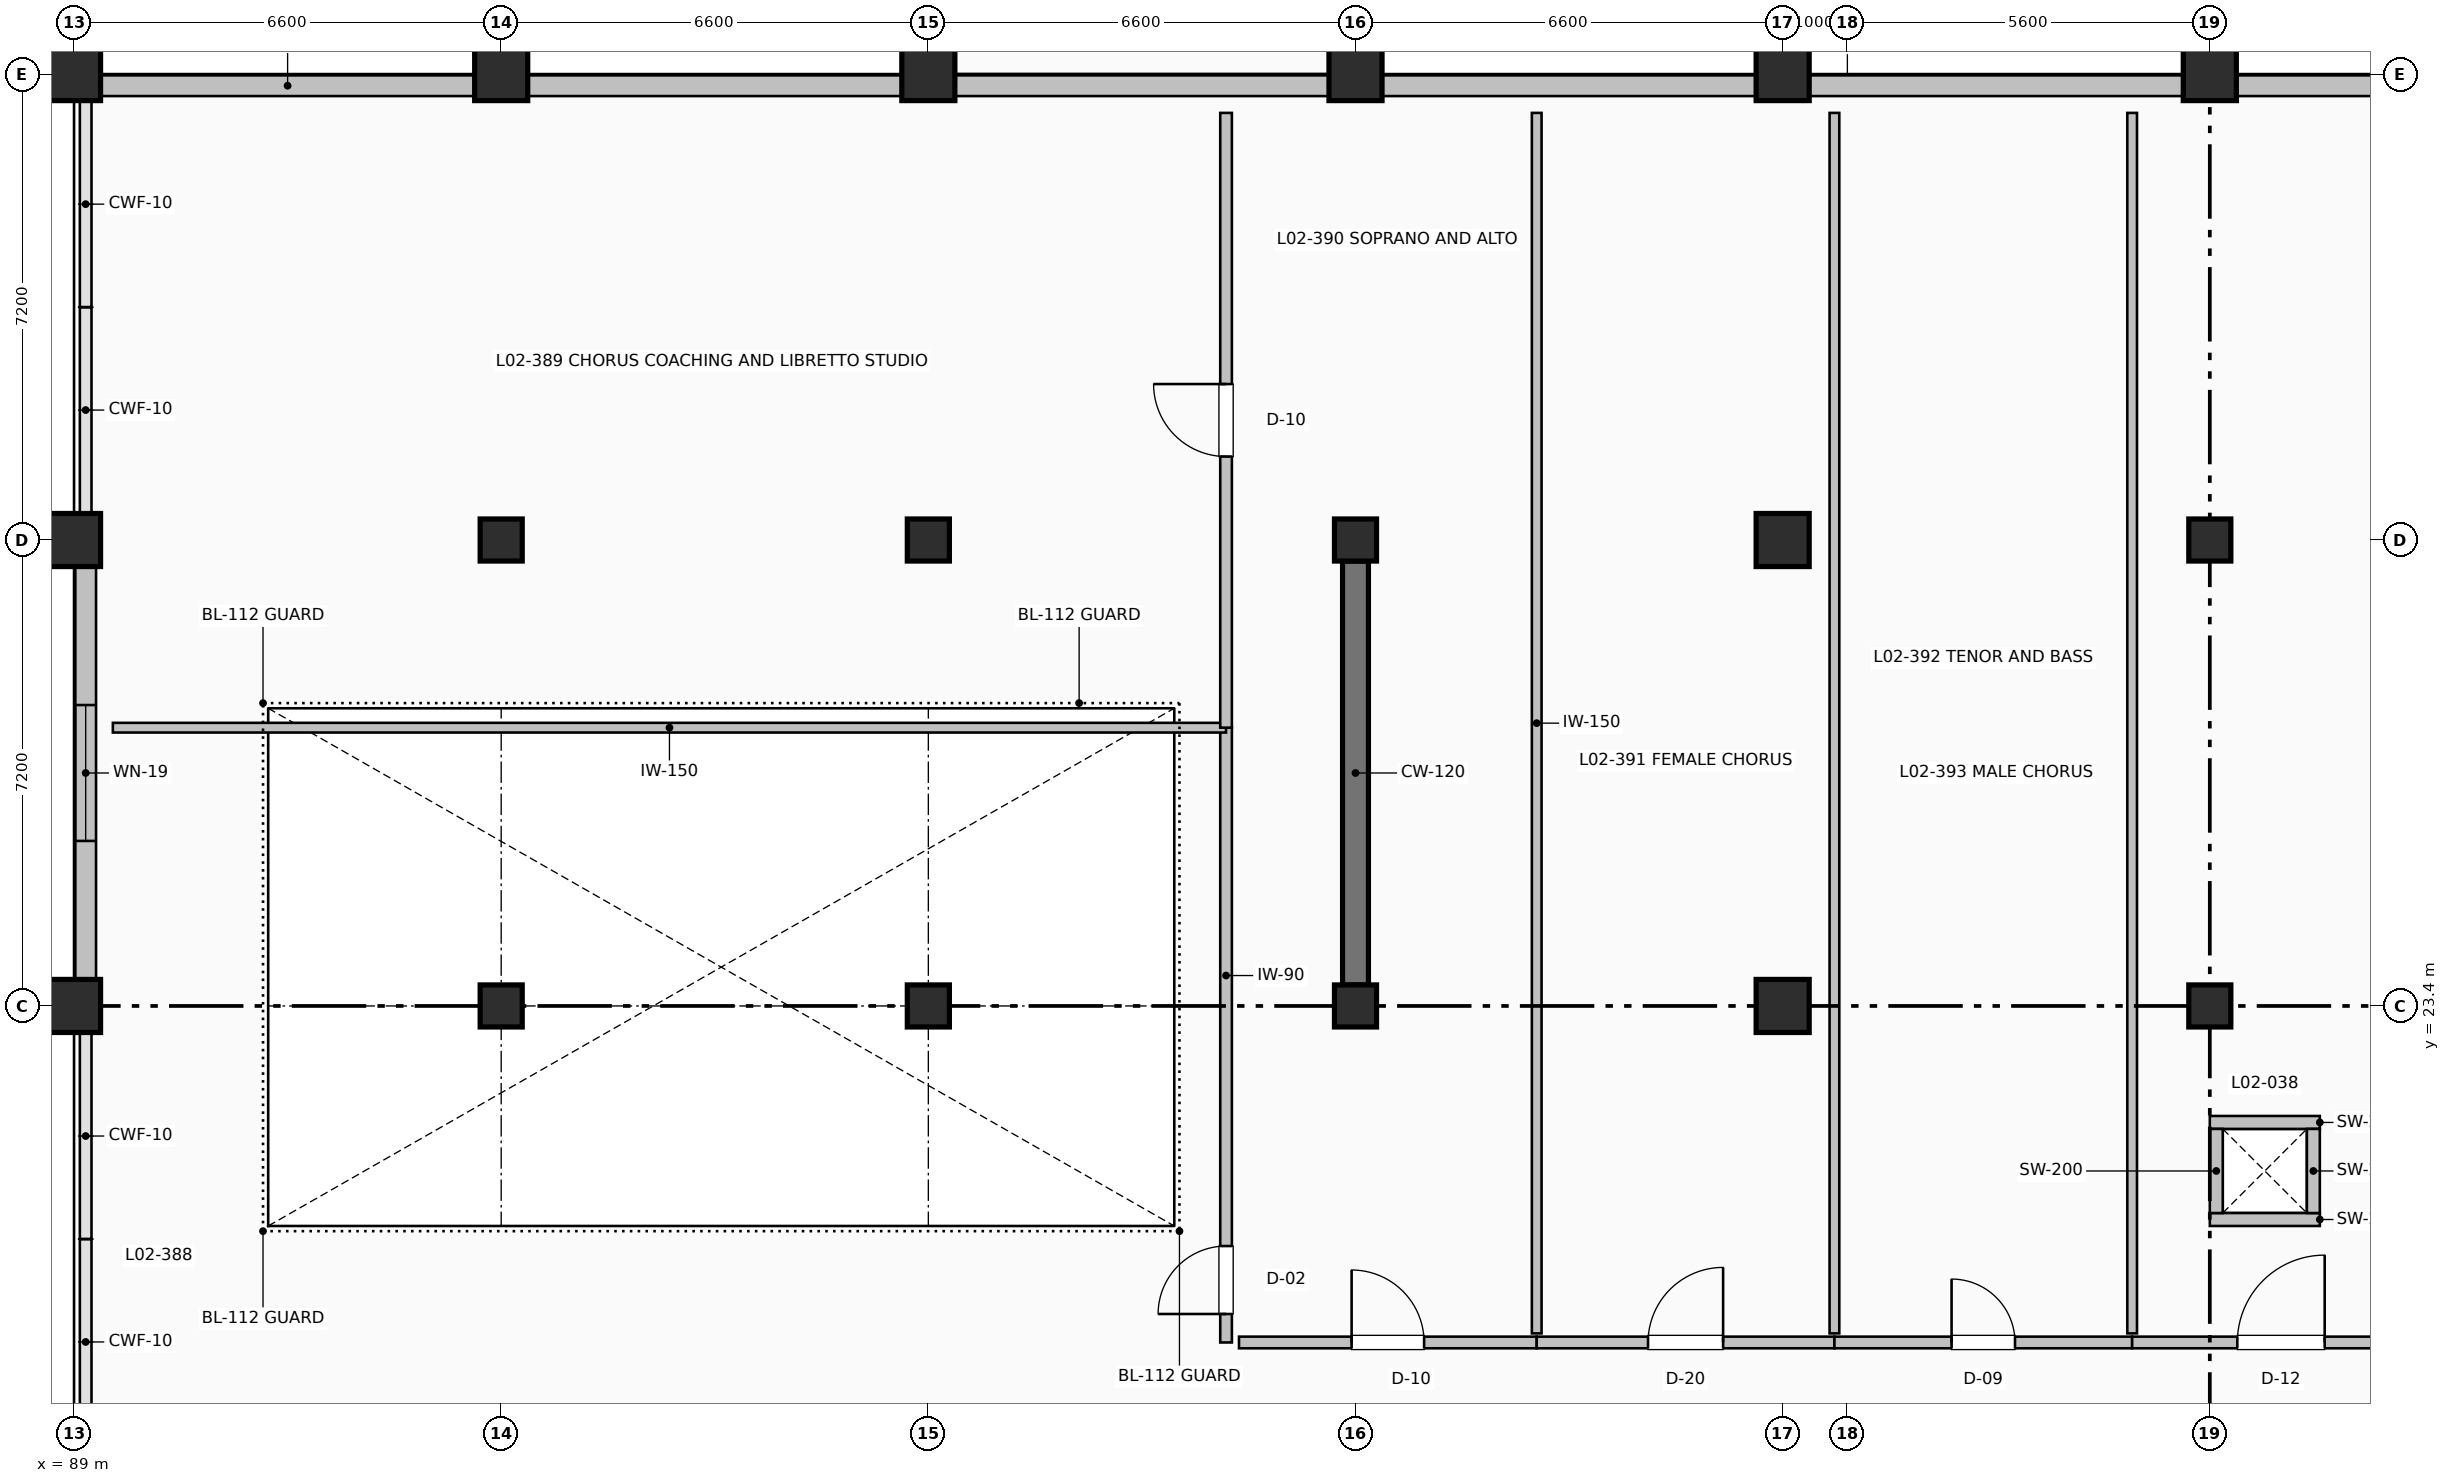
"""IFC4 building model, lengths in metres.
Left out: names, types, materials, properties, quantities, classifications, styles, units other than length and angle.
Written with IfcOpenShell. Run it as: python <this file> out.ifc"""

import sys

from ifc_helpers import new_model, si_unit, direction, frame, frame_2d, origin, origin_2d, place, context, subcontext, project, spatial, rectangle, extrude, element, fill, save


model = new_model("IFC4")
c1 = context("Model", 3, precision=1e-05, world=origin(), true_north=direction((0.0, 1.0)))
c2 = subcontext(c1, "Body", "Model", "MODEL_VIEW")
j1 = project(units=[si_unit("LENGTHUNIT", "METRE"), si_unit("PLANEANGLEUNIT", "RADIAN")], contexts=[c1])
p1 = place(None, origin())
s1 = spatial("IfcSite", under=j1, at=p1, CompositionType="ELEMENT")
p2 = place(p1, origin())
s2 = spatial("IfcBuilding", under=s1, at=p2, CompositionType="ELEMENT")
p3 = place(p2, frame((0.0, 0.0, 10.2)))
s3 = spatial("IfcBuildingStorey", under=s2, at=p3, CompositionType="ELEMENT", Elevation=10.2)
for number, where, z_axis, x_axis in (
    (1, (89.0, 23.4, 0.0), (0.0, 0.0, 1.0), (1.0, 0.0, 0.0)),
    (2, (89.0, 30.6, 0.0), (0.0, 0.0, 1.0), (1.0, 0.0, 0.0)),
    (3, (89.0, 37.8, 0.0), (0.0, 0.0, 1.0), (1.0, 0.0, 0.0)),
):
    element("IfcColumn", number, at=place(p3, frame(where, z_axis=z_axis, x_axis=x_axis)), inside=s3, PredefinedType="COLUMN", context=c2, shape_type="SweptSolid", body=[
        extrude(rectangle(XDim=0.82, YDim=0.82, at=origin_2d()), origin(), (0.0, 0.0, 1.0), 4.8),
    ])
for number, where, z_axis, x_axis in (
    (4, (95.6, 23.4, 0.0), (0.0, 0.0, 1.0), (1.0, 0.0, 0.0)),
    (5, (95.6, 30.6, 0.0), (0.0, 0.0, 1.0), (1.0, 0.0, 0.0)),
):
    element("IfcColumn", number, at=place(p3, frame(where, z_axis=z_axis, x_axis=x_axis)), inside=s3, PredefinedType="COLUMN", context=c2, shape_type="SweptSolid", body=[
        extrude(rectangle(XDim=0.65, YDim=0.65, at=origin_2d()), origin(), (0.0, 0.0, 1.0), 4.8),
    ])
p4 = place(p3, frame((95.6, 37.8, 0.0), z_axis=(0.0, 0.0, 1.0), x_axis=(1.0, 0.0, 0.0)))
e6 = element("IfcColumn", 6, at=p4, inside=s3, PredefinedType="COLUMN", context=c2, shape_type="SweptSolid", body=[
    extrude(rectangle(XDim=0.82, YDim=0.82, at=origin_2d()), origin(), (0.0, 0.0, 1.0), 4.8),
])
for number, where, z_axis, x_axis in (
    (7, (102.2, 23.4, 0.0), (0.0, 0.0, 1.0), (1.0, 0.0, 0.0)),
    (8, (102.2, 30.6, 0.0), (0.0, 0.0, 1.0), (1.0, 0.0, 0.0)),
):
    element("IfcColumn", number, at=place(p3, frame(where, z_axis=z_axis, x_axis=x_axis)), inside=s3, PredefinedType="COLUMN", context=c2, shape_type="SweptSolid", body=[
        extrude(rectangle(XDim=0.65, YDim=0.65, at=origin_2d()), origin(), (0.0, 0.0, 1.0), 4.8),
    ])
p5 = place(p3, frame((102.2, 37.8, 0.0), z_axis=(0.0, 0.0, 1.0), x_axis=(1.0, 0.0, 0.0)))
e9 = element("IfcColumn", 9, at=p5, inside=s3, PredefinedType="COLUMN", context=c2, shape_type="SweptSolid", body=[
    extrude(rectangle(XDim=0.82, YDim=0.82, at=origin_2d()), origin(), (0.0, 0.0, 1.0), 4.8),
])
for number, where, z_axis, x_axis in (
    (10, (108.8, 23.4, 0.0), (0.0, 0.0, 1.0), (1.0, 0.0, 0.0)),
    (11, (108.8, 30.6, 0.0), (0.0, 0.0, 1.0), (1.0, 0.0, 0.0)),
):
    element("IfcColumn", number, at=place(p3, frame(where, z_axis=z_axis, x_axis=x_axis)), inside=s3, PredefinedType="COLUMN", context=c2, shape_type="SweptSolid", body=[
        extrude(rectangle(XDim=0.65, YDim=0.65, at=origin_2d()), origin(), (0.0, 0.0, 1.0), 4.8),
    ])
for number, where, z_axis, x_axis in (
    (12, (108.8, 37.8, 0.0), (0.0, 0.0, 1.0), (1.0, 0.0, 0.0)),
    (13, (115.4, 23.4, 0.0), (0.0, 0.0, 1.0), (1.0, 0.0, 0.0)),
    (14, (115.4, 30.6, 0.0), (0.0, 0.0, 1.0), (1.0, 0.0, 0.0)),
    (15, (115.4, 37.8, 0.0), (0.0, 0.0, 1.0), (1.0, 0.0, 0.0)),
):
    element("IfcColumn", number, at=place(p3, frame(where, z_axis=z_axis, x_axis=x_axis)), inside=s3, PredefinedType="COLUMN", context=c2, shape_type="SweptSolid", body=[
        extrude(rectangle(XDim=0.82, YDim=0.82, at=origin_2d()), origin(), (0.0, 0.0, 1.0), 4.8),
    ])
for number, where, z_axis, x_axis in (
    (16, (122.0, 23.4, 0.0), (0.0, 0.0, 1.0), (1.0, 0.0, 0.0)),
    (17, (122.0, 30.6, 0.0), (0.0, 0.0, 1.0), (1.0, 0.0, 0.0)),
):
    element("IfcColumn", number, at=place(p3, frame(where, z_axis=z_axis, x_axis=x_axis)), inside=s3, PredefinedType="COLUMN", context=c2, shape_type="SweptSolid", body=[
        extrude(rectangle(XDim=0.65, YDim=0.65, at=origin_2d()), origin(), (0.0, 0.0, 1.0), 4.8),
    ])
p6 = place(p3, frame((122.0, 37.8, 0.0), z_axis=(0.0, 0.0, 1.0), x_axis=(1.0, 0.0, 0.0)))
e18 = element("IfcColumn", 18, at=p6, inside=s3, PredefinedType="COLUMN", context=c2, shape_type="SweptSolid", body=[
    extrude(rectangle(XDim=0.82, YDim=0.82, at=origin_2d()), origin(), (0.0, 0.0, 1.0), 4.8),
])
p7 = place(p3, frame((108.8, 23.725, 0.0), z_axis=(0.0, 0.0, 1.0), x_axis=(0.0, 1.0, 0.0)))
e19 = element("IfcWall", 19, at=p7, inside=s3, PredefinedType="SHEAR", context=c2, shape_type="SweptSolid", body=[
    extrude(rectangle(XDim=6.55, YDim=0.4, at=frame_2d((3.275, 0.0))), origin(), (0.0, 0.0, 1.0), 4.48),
])
for number, where, z_axis, x_axis in (
    (20, (89.41, 37.62, 0.0), (0.0, 0.0, 1.0), (1.0, 0.0, 0.0)),
    (21, (96.01, 37.62, 0.0), (0.0, 0.0, 1.0), (1.0, 0.0, 0.0)),
):
    element("IfcWall", number, at=place(p3, frame(where, z_axis=z_axis, x_axis=x_axis)), inside=s3, PredefinedType="SOLIDWALL", context=c2, shape_type="SweptSolid", body=[
        extrude(rectangle(XDim=5.78, YDim=0.32, at=frame_2d((2.89, 0.0))), origin(), (0.0, 0.0, 1.0), 3.742),
    ])
p8 = place(p3, frame((102.61, 37.62, 0.0), z_axis=(0.0, 0.0, 1.0), x_axis=(1.0, 0.0, 0.0)))
e22 = element("IfcWall", 22, at=p8, inside=s3, PredefinedType="SOLIDWALL", context=c2, shape_type="SweptSolid", body=[
    extrude(rectangle(XDim=5.78, YDim=0.32, at=frame_2d((2.89, 0.0))), origin(), (0.0, 0.0, 1.0), 3.742),
])
for number, where, z_axis, x_axis in (
    (23, (109.21, 37.62, 0.0), (0.0, 0.0, 1.0), (1.0, 0.0, 0.0)),
    (24, (115.81, 37.62, 0.0), (0.0, 0.0, 1.0), (1.0, 0.0, 0.0)),
    (25, (122.41, 37.62, 0.0), (0.0, 0.0, 1.0), (1.0, 0.0, 0.0)),
):
    element("IfcWall", number, at=place(p3, frame(where, z_axis=z_axis, x_axis=x_axis)), inside=s3, PredefinedType="SOLIDWALL", context=c2, shape_type="SweptSolid", body=[
        extrude(rectangle(XDim=5.78, YDim=0.32, at=frame_2d((2.89, 0.0))), origin(), (0.0, 0.0, 1.0), 3.742),
    ])
p9 = place(p3, frame((89.18, 23.81, 0.0), z_axis=(0.0, 0.0, 1.0), x_axis=(0.0, 1.0, 0.0)))
e26 = element("IfcWall", 26, at=p9, inside=s3, PredefinedType="SOLIDWALL", context=c2, shape_type="SweptSolid", body=[
    extrude(rectangle(XDim=6.38, YDim=0.32, at=frame_2d((3.19, 0.0))), origin(), (0.0, 0.0, 1.0), 3.742),
])
p10 = place(p9, frame((2.14, 0.0, 1.0)))
e27 = element("IfcOpeningElement", 27, at=p10, cuts=e26, PredefinedType="OPENING", context=c2, shape_type="SweptSolid", body=[
    extrude(rectangle(XDim=2.1, YDim=1.7, at=frame_2d((1.05, 0.85))), frame((0.0, 0.17, 0.0), z_axis=(0.0, -1.0, 0.0), x_axis=(1.0, 0.0, 0.0)), (0.0, 0.0, 1.0), 0.34),
])
for number, where, z_axis, x_axis in (
    (28, (122.0, 20.1, 0.0), (0.0, 0.0, 1.0), (1.0, 0.0, 0.0)),
    (29, (123.7, 21.6, 0.0), (0.0, 0.0, 1.0), (-1.0, 0.0, 0.0)),
):
    element("IfcWall", number, at=place(p3, frame(where, z_axis=z_axis, x_axis=x_axis)), inside=s3, PredefinedType="PARTITIONING", context=c2, shape_type="SweptSolid", body=[
        extrude(rectangle(XDim=1.7, YDim=0.2, at=frame_2d((0.85, 0.0))), origin(), (0.0, 0.0, 1.0), 4.5),
    ])
p11 = place(p3, frame((122.1, 20.2, 0.0), z_axis=(0.0, 0.0, 1.0), x_axis=(0.0, 1.0, 0.0)))
e30 = element("IfcWall", 30, at=p11, inside=s3, PredefinedType="PARTITIONING", context=c2, shape_type="SweptSolid", body=[
    extrude(rectangle(XDim=1.3, YDim=0.2, at=frame_2d((0.65, 0.0))), origin(), (0.0, 0.0, 1.0), 3.742),
])
p12 = place(p3, frame((123.6, 21.5, 0.0), z_axis=(0.0, 0.0, 1.0), x_axis=(0.0, -1.0, 0.0)))
e31 = element("IfcWall", 31, at=p12, inside=s3, PredefinedType="PARTITIONING", context=c2, shape_type="SweptSolid", body=[
    extrude(rectangle(XDim=1.3, YDim=0.2, at=frame_2d((0.65, 0.0))), origin(), (0.0, 0.0, 1.0), 4.5),
])
p13 = place(p3, frame((106.8, 18.2, 0.0), z_axis=(0.0, 0.0, 1.0), x_axis=(0.0, 1.0, 0.0)))
e32 = element("IfcWall", 32, at=p13, inside=s3, PredefinedType="PARTITIONING", context=c2, shape_type="SweptSolid", body=[
    extrude(rectangle(XDim=9.5, YDim=0.18, at=frame_2d((4.75, 0.0))), origin(), (0.0, 0.0, 1.0), 4.492),
])
p14 = place(p13, frame((0.44, 0.0, 0.0)))
e33 = element("IfcOpeningElement", 33, at=p14, cuts=e32, PredefinedType="OPENING", context=c2, shape_type="SweptSolid", body=[
    extrude(rectangle(XDim=1.05, YDim=2.1, at=frame_2d((0.525, 1.05))), frame((0.0, 0.1, 0.0), z_axis=(0.0, -1.0, 0.0), x_axis=(1.0, 0.0, 0.0)), (0.0, 0.0, 1.0), 0.2),
])
p15 = place(p3, frame((89.6, 27.7, 0.0), z_axis=(0.0, 0.0, 1.0), x_axis=(1.0, 0.0, 0.0)))
e34 = element("IfcWall", 34, at=p15, inside=s3, PredefinedType="PARTITIONING", context=c2, shape_type="SweptSolid", body=[
    extrude(rectangle(XDim=17.2, YDim=0.15, at=frame_2d((8.6, 0.0))), origin(), (0.0, 0.0, 1.0), 4.492),
])
p16 = place(p3, frame((106.8, 27.7, 0.0), z_axis=(0.0, 0.0, 1.0), x_axis=(0.0, 1.0, 0.0)))
e35 = element("IfcWall", 35, at=p16, inside=s3, PredefinedType="PARTITIONING", context=c2, shape_type="SweptSolid", body=[
    extrude(rectangle(XDim=9.5, YDim=0.18, at=frame_2d((4.75, 0.0))), origin(), (0.0, 0.0, 1.0), 4.492),
])
p17 = place(p16, frame((4.19, 0.0, 0.0)))
e36 = element("IfcOpeningElement", 36, at=p17, cuts=e35, PredefinedType="OPENING", context=c2, shape_type="SweptSolid", body=[
    extrude(rectangle(XDim=1.12, YDim=2.12, at=frame_2d((0.56, 1.06))), frame((0.0, 0.1, 0.0), z_axis=(0.0, -1.0, 0.0), x_axis=(1.0, 0.0, 0.0)), (0.0, 0.0, 1.0), 0.2),
])
p18 = place(p3, frame((107.0, 18.2, 0.0), z_axis=(0.0, 0.0, 1.0), x_axis=(1.0, 0.0, 0.0)))
e37 = element("IfcWall", 37, at=p18, inside=s3, PredefinedType="PARTITIONING", context=c2, shape_type="SweptSolid", body=[
    extrude(rectangle(XDim=4.6, YDim=0.18, at=frame_2d((2.3, 0.0))), origin(), (0.0, 0.0, 1.0), 4.492),
])
p19 = place(p18, frame((1.74, 0.0, 0.0)))
e38 = element("IfcOpeningElement", 38, at=p19, cuts=e37, PredefinedType="OPENING", context=c2, shape_type="SweptSolid", body=[
    extrude(rectangle(XDim=1.12, YDim=2.12, at=frame_2d((0.56, 1.06))), frame((0.0, 0.1, 0.0), z_axis=(0.0, -1.0, 0.0), x_axis=(1.0, 0.0, 0.0)), (0.0, 0.0, 1.0), 0.2),
])
p20 = place(p3, frame((111.6, 18.34, 0.0), z_axis=(0.0, 0.0, 1.0), x_axis=(0.0, 1.0, 0.0)))
e39 = element("IfcWall", 39, at=p20, inside=s3, PredefinedType="PARTITIONING", context=c2, shape_type="SweptSolid", body=[
    extrude(rectangle(XDim=18.86, YDim=0.15, at=frame_2d((9.43, 0.0))), origin(), (0.0, 0.0, 1.0), 4.492),
])
p21 = place(p3, frame((111.6, 18.2, 0.0), z_axis=(0.0, 0.0, 1.0), x_axis=(1.0, 0.0, 0.0)))
e40 = element("IfcWall", 40, at=p21, inside=s3, PredefinedType="PARTITIONING", context=c2, shape_type="SweptSolid", body=[
    extrude(rectangle(XDim=4.6, YDim=0.18, at=frame_2d((2.3, 0.0))), origin(), (0.0, 0.0, 1.0), 4.492),
])
p22 = place(p21, frame((1.72, 0.0, 0.0)))
e41 = element("IfcOpeningElement", 41, at=p22, cuts=e40, PredefinedType="OPENING", context=c2, shape_type="SweptSolid", body=[
    extrude(rectangle(XDim=1.16, YDim=2.1, at=frame_2d((0.58, 1.05))), frame((0.0, 0.1, 0.0), z_axis=(0.0, -1.0, 0.0), x_axis=(1.0, 0.0, 0.0)), (0.0, 0.0, 1.0), 0.2),
])
p23 = place(p3, frame((116.2, 18.34, 0.0), z_axis=(0.0, 0.0, 1.0), x_axis=(0.0, 1.0, 0.0)))
e42 = element("IfcWall", 42, at=p23, inside=s3, PredefinedType="PARTITIONING", context=c2, shape_type="SweptSolid", body=[
    extrude(rectangle(XDim=18.86, YDim=0.15, at=frame_2d((9.43, 0.0))), origin(), (0.0, 0.0, 1.0), 4.492),
])
p24 = place(p3, frame((116.2, 18.2, 0.0), z_axis=(0.0, 0.0, 1.0), x_axis=(1.0, 0.0, 0.0)))
e43 = element("IfcWall", 43, at=p24, inside=s3, PredefinedType="PARTITIONING", context=c2, shape_type="SweptSolid", body=[
    extrude(rectangle(XDim=4.6, YDim=0.18, at=frame_2d((2.3, 0.0))), origin(), (0.0, 0.0, 1.0), 4.492),
])
p25 = place(p24, frame((1.81, 0.0, 0.0)))
e44 = element("IfcOpeningElement", 44, at=p25, cuts=e43, PredefinedType="OPENING", context=c2, shape_type="SweptSolid", body=[
    extrude(rectangle(XDim=0.98, YDim=2.08, at=frame_2d((0.49, 1.04))), frame((0.0, 0.1, 0.0), z_axis=(0.0, -1.0, 0.0), x_axis=(1.0, 0.0, 0.0)), (0.0, 0.0, 1.0), 0.2),
])
p26 = place(p3, frame((120.8, 18.34, 0.0), z_axis=(0.0, 0.0, 1.0), x_axis=(0.0, 1.0, 0.0)))
e45 = element("IfcWall", 45, at=p26, inside=s3, PredefinedType="PARTITIONING", context=c2, shape_type="SweptSolid", body=[
    extrude(rectangle(XDim=18.86, YDim=0.15, at=frame_2d((9.43, 0.0))), origin(), (0.0, 0.0, 1.0), 4.492),
])
p27 = place(p3, frame((120.8, 18.2, 0.0), z_axis=(0.0, 0.0, 1.0), x_axis=(1.0, 0.0, 0.0)))
e46 = element("IfcWall", 46, at=p27, inside=s3, PredefinedType="PARTITIONING", context=c2, shape_type="SweptSolid", body=[
    extrude(rectangle(XDim=4.6, YDim=0.18, at=frame_2d((2.3, 0.0))), origin(), (0.0, 0.0, 1.0), 4.492),
])
p28 = place(p27, frame((1.625, 0.0, 0.0)))
e47 = element("IfcOpeningElement", 47, at=p28, cuts=e46, PredefinedType="OPENING", context=c2, shape_type="SweptSolid", body=[
    extrude(rectangle(XDim=1.35, YDim=2.16, at=frame_2d((0.675, 1.08))), frame((0.0, 0.1, 0.0), z_axis=(0.0, -1.0, 0.0), x_axis=(1.0, 0.0, 0.0)), (0.0, 0.0, 1.0), 0.2),
])
p29 = place(p10, origin())
e48 = element("IfcWindow", 48, at=p29, inside=s3, PartitioningType="SINGLE_PANEL", PredefinedType="WINDOW", context=c2, shape_type="SweptSolid", body=[
    extrude(rectangle(XDim=2.1, YDim=1.7, at=frame_2d((1.05, 0.85))), frame((0.0, 0.03, 0.0), z_axis=(0.0, -1.0, 0.0), x_axis=(1.0, 0.0, 0.0)), (0.0, 0.0, 1.0), 0.06),
])
fill(e27, e48)
p30 = place(p14, origin())
e49 = element("IfcDoor", 49, at=p30, inside=s3, OperationType="SINGLE_SWING_LEFT", PredefinedType="DOOR", context=c2, shape_type="SweptSolid", body=[
    extrude(rectangle(XDim=1.05, YDim=2.1, at=frame_2d((0.525, 1.05))), frame((0.0, 0.025, 0.0), z_axis=(0.0, -1.0, 0.0), x_axis=(1.0, 0.0, 0.0)), (0.0, 0.0, 1.0), 0.05),
])
fill(e33, e49)
p31 = place(p17, origin())
e50 = element("IfcDoor", 50, at=p31, inside=s3, OperationType="SINGLE_SWING_RIGHT", PredefinedType="DOOR", context=c2, shape_type="SweptSolid", body=[
    extrude(rectangle(XDim=1.12, YDim=2.12, at=frame_2d((0.56, 1.06))), frame((0.0, 0.025, 0.0), z_axis=(0.0, -1.0, 0.0), x_axis=(1.0, 0.0, 0.0)), (0.0, 0.0, 1.0), 0.05),
])
fill(e36, e50)
p32 = place(p19, origin())
e51 = element("IfcDoor", 51, at=p32, inside=s3, OperationType="SINGLE_SWING_LEFT", PredefinedType="DOOR", context=c2, shape_type="SweptSolid", body=[
    extrude(rectangle(XDim=1.12, YDim=2.12, at=frame_2d((0.56, 1.06))), frame((0.0, 0.025, 0.0), z_axis=(0.0, -1.0, 0.0), x_axis=(1.0, 0.0, 0.0)), (0.0, 0.0, 1.0), 0.05),
])
fill(e38, e51)
p33 = place(p22, origin())
e52 = element("IfcDoor", 52, at=p33, inside=s3, OperationType="SINGLE_SWING_RIGHT", PredefinedType="DOOR", context=c2, shape_type="SweptSolid", body=[
    extrude(rectangle(XDim=1.16, YDim=2.1, at=frame_2d((0.58, 1.05))), frame((0.0, 0.025, 0.0), z_axis=(0.0, -1.0, 0.0), x_axis=(1.0, 0.0, 0.0)), (0.0, 0.0, 1.0), 0.05),
])
fill(e41, e52)
p34 = place(p25, origin())
e53 = element("IfcDoor", 53, at=p34, inside=s3, OperationType="SINGLE_SWING_LEFT", PredefinedType="DOOR", context=c2, shape_type="SweptSolid", body=[
    extrude(rectangle(XDim=0.98, YDim=2.08, at=frame_2d((0.49, 1.04))), frame((0.0, 0.025, 0.0), z_axis=(0.0, -1.0, 0.0), x_axis=(1.0, 0.0, 0.0)), (0.0, 0.0, 1.0), 0.05),
])
fill(e44, e53)
p35 = place(p28, origin())
e54 = element("IfcDoor", 54, at=p35, inside=s3, OperationType="SINGLE_SWING_RIGHT", PredefinedType="DOOR", context=c2, shape_type="SweptSolid", body=[
    extrude(rectangle(XDim=1.35, YDim=2.16, at=frame_2d((0.675, 1.08))), frame((0.0, 0.025, 0.0), z_axis=(0.0, -1.0, 0.0), x_axis=(1.0, 0.0, 0.0)), (0.0, 0.0, 1.0), 0.05),
])
fill(e47, e54)
save(model, sys.argv[1])
